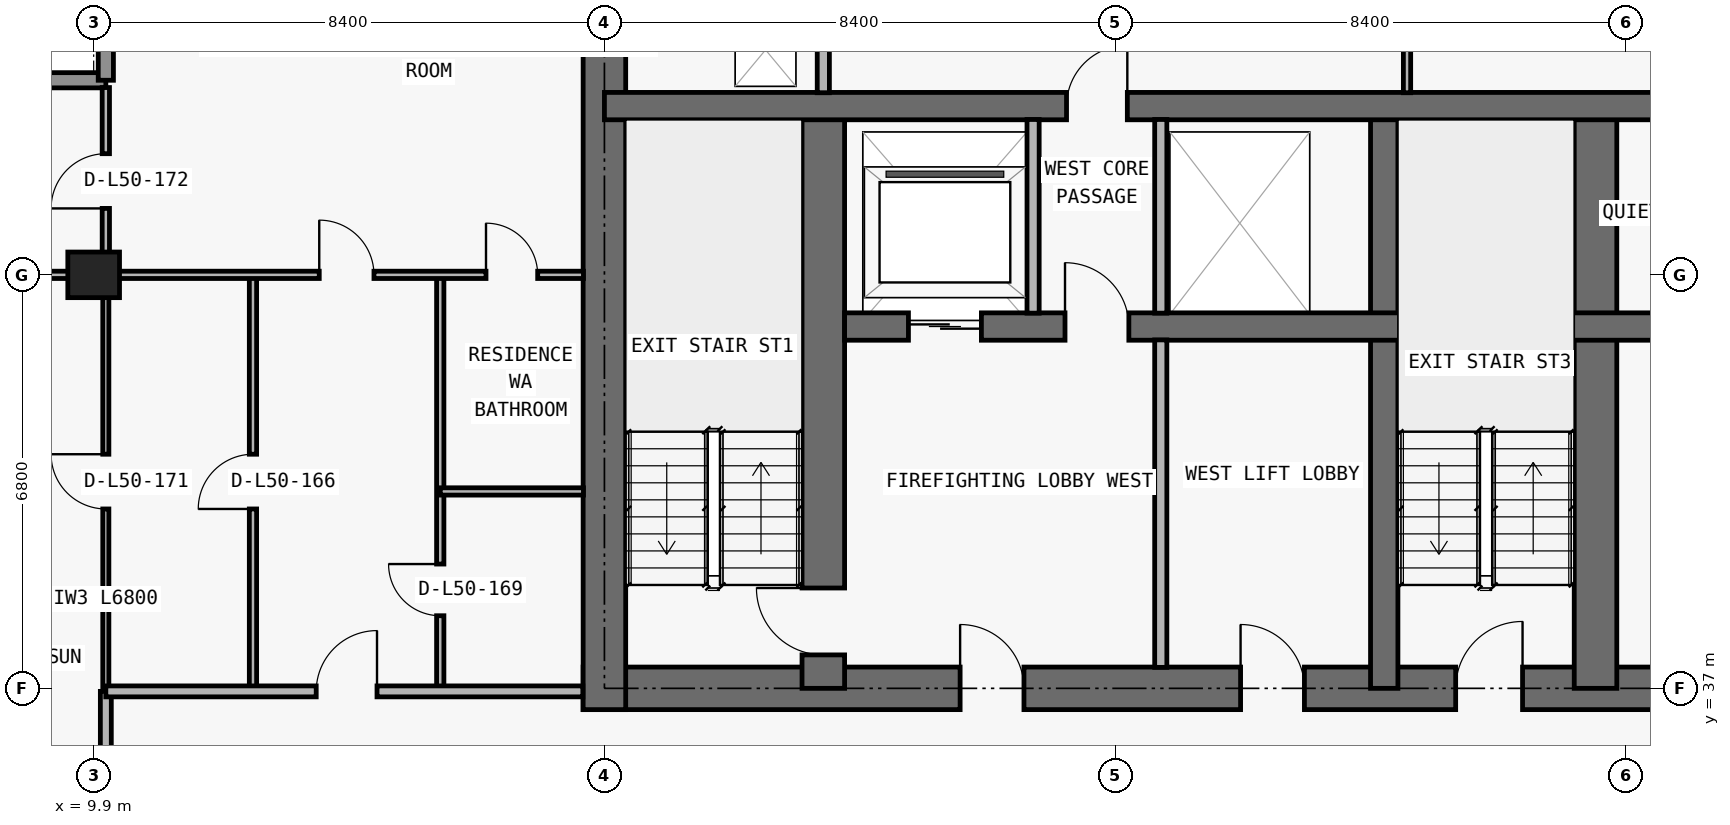
"""IFC4 building model, lengths in metres.
Left out: names, types, materials, properties, quantities, classifications, styles, units other than length and angle.
Written with IfcOpenShell. Run it as: python <this file> out.ifc"""

import sys

from ifc_helpers import new_model, si_unit, direction, frame, frame_2d, origin, origin_2d, place, context, subcontext, project, spatial, rectangle, extrude, element, fill, save


model = new_model("IFC4")
c1 = context("Model", 3, precision=1e-05, world=origin(), true_north=direction((0.0, 1.0)))
c2 = subcontext(c1, "Body", "Model", "MODEL_VIEW")
j1 = project(units=[si_unit("LENGTHUNIT", "METRE"), si_unit("PLANEANGLEUNIT", "RADIAN")], contexts=[c1])
p1 = place(None, origin())
s1 = spatial("IfcSite", under=j1, at=p1, CompositionType="ELEMENT")
p2 = place(p1, origin())
s2 = spatial("IfcBuilding", under=s1, at=p2, CompositionType="ELEMENT")
p3 = place(p2, frame((0.0, 0.0, 180.3)))
s3 = spatial("IfcBuildingStorey", under=s2, at=p3, CompositionType="ELEMENT", Elevation=180.3)
p4 = place(p3, frame((9.9, 43.8, 0.0), z_axis=(0.0, 0.0, 1.0), x_axis=(1.0, 0.0, 0.0)))
e1 = element("IfcColumn", 1, at=p4, inside=s3, PredefinedType="COLUMN", context=c2, shape_type="SweptSolid", body=[
    extrude(rectangle(XDim=0.85, YDim=0.75, at=origin_2d()), origin(), (0.0, 0.0, 1.0), 3.0),
])
p5 = place(p3, frame((17.95, 37.0, 0.0), z_axis=(0.0, 0.0, 1.0), x_axis=(1.0, 0.0, 0.0)))
e2 = element("IfcWall", 2, at=p5, inside=s3, PredefinedType="SHEAR", context=c2, shape_type="SweptSolid", body=[
    extrude(rectangle(XDim=41.9, YDim=0.7, at=frame_2d((20.95, 0.0))), origin(), (0.0, 0.0, 1.0), 3.0),
])
p6 = place(p5, frame((14.35, 0.0, 0.0)))
e3 = element("IfcOpeningElement", 3, at=p6, cuts=e2, PredefinedType="OPENING", context=c2, shape_type="SweptSolid", body=[
    extrude(rectangle(XDim=1.1, YDim=2.15, at=frame_2d((0.55, 1.075))), frame((0.0, 0.36, 0.0), z_axis=(0.0, -1.0, 0.0), x_axis=(1.0, 0.0, 0.0)), (0.0, 0.0, 1.0), 0.72),
])
p7 = place(p5, frame((6.2, 0.0, 0.0)))
e4 = element("IfcOpeningElement", 4, at=p7, cuts=e2, PredefinedType="OPENING", context=c2, shape_type="SweptSolid", body=[
    extrude(rectangle(XDim=1.05, YDim=2.15, at=frame_2d((0.525, 1.075))), frame((0.0, 0.36, 0.0), z_axis=(0.0, -1.0, 0.0), x_axis=(1.0, 0.0, 0.0)), (0.0, 0.0, 1.0), 0.72),
])
p8 = place(p5, frame((34.7, 0.0, 0.0)))
e5 = element("IfcOpeningElement", 5, at=p8, cuts=e2, PredefinedType="OPENING", context=c2, shape_type="SweptSolid", body=[
    extrude(rectangle(XDim=1.05, YDim=2.15, at=frame_2d((0.525, 1.075))), frame((0.0, 0.36, 0.0), z_axis=(0.0, -1.0, 0.0), x_axis=(1.0, 0.0, 0.0)), (0.0, 0.0, 1.0), 0.72),
])
p9 = place(p5, frame((10.812, 0.0, 0.0)))
e6 = element("IfcOpeningElement", 6, at=p9, cuts=e2, PredefinedType="OPENING", context=c2, shape_type="SweptSolid", body=[
    extrude(rectangle(XDim=1.05, YDim=2.15, at=frame_2d((0.525, 1.075))), frame((0.0, 0.36, 0.0), z_axis=(0.0, -1.0, 0.0), x_axis=(1.0, 0.0, 0.0)), (0.0, 0.0, 1.0), 0.72),
])
p10 = place(p5, frame((24.05, 0.0, 0.0)))
e7 = element("IfcOpeningElement", 7, at=p10, cuts=e2, PredefinedType="OPENING", context=c2, shape_type="SweptSolid", body=[
    extrude(rectangle(XDim=1.05, YDim=2.15, at=frame_2d((0.525, 1.075))), frame((0.0, 0.36, 0.0), z_axis=(0.0, -1.0, 0.0), x_axis=(1.0, 0.0, 0.0)), (0.0, 0.0, 1.0), 0.72),
])
p11 = place(p3, frame((18.3, 36.65, 0.0), z_axis=(0.0, 0.0, 1.0), x_axis=(0.0, 1.0, 0.0)))
e8 = element("IfcWall", 8, at=p11, inside=s3, PredefinedType="SHEAR", context=c2, shape_type="SweptSolid", body=[
    extrude(rectangle(XDim=13.95, YDim=0.7, at=frame_2d((6.975, 0.0))), origin(), (0.0, 0.0, 1.0), 3.0),
])
p12 = place(p3, frame((21.9, 37.0, 0.0), z_axis=(0.0, 0.0, 1.0), x_axis=(0.0, 1.0, 0.0)))
e9 = element("IfcWall", 9, at=p12, inside=s3, PredefinedType="SHEAR", context=c2, shape_type="SweptSolid", body=[
    extrude(rectangle(XDim=9.575, YDim=0.7, at=frame_2d((4.788, 0.0))), origin(), (0.0, 0.0, 1.0), 3.0),
])
p13 = place(p12, frame((0.55, 0.0, 0.0)))
e10 = element("IfcOpeningElement", 10, at=p13, cuts=e9, PredefinedType="OPENING", context=c2, shape_type="SweptSolid", body=[
    extrude(rectangle(XDim=1.1, YDim=2.15, at=frame_2d((0.55, 1.075))), frame((0.0, 0.36, 0.0), z_axis=(0.0, -1.0, 0.0), x_axis=(1.0, 0.0, 0.0)), (0.0, 0.0, 1.0), 0.72),
])
p14 = place(p3, frame((31.125, 37.0, 0.0), z_axis=(0.0, 0.0, 1.0), x_axis=(0.0, 1.0, 0.0)))
e11 = element("IfcWall", 11, at=p14, inside=s3, PredefinedType="SHEAR", context=c2, shape_type="SweptSolid", body=[
    extrude(rectangle(XDim=9.575, YDim=0.45, at=frame_2d((4.788, 0.0))), origin(), (0.0, 0.0, 1.0), 3.0),
])
p15 = place(p3, frame((34.6, 37.0, 0.0), z_axis=(0.0, 0.0, 1.0), x_axis=(0.0, 1.0, 0.0)))
e12 = element("IfcWall", 12, at=p15, inside=s3, PredefinedType="SHEAR", context=c2, shape_type="SweptSolid", body=[
    extrude(rectangle(XDim=9.575, YDim=0.7, at=frame_2d((4.788, 0.0))), origin(), (0.0, 0.0, 1.0), 3.0),
])
p16 = place(p3, frame((22.25, 42.95, 0.0), z_axis=(0.0, 0.0, 1.0), x_axis=(1.0, 0.0, 0.0)))
e13 = element("IfcWall", 13, at=p16, inside=s3, PredefinedType="SHEAR", context=c2, shape_type="SweptSolid", body=[
    extrude(rectangle(XDim=33.3, YDim=0.45, at=frame_2d((16.65, 0.0))), origin(), (0.0, 0.0, 1.0), 3.0),
])
p17 = place(p16, frame((1.05, 0.0, 0.0)))
e14 = element("IfcOpeningElement", 14, at=p17, cuts=e13, PredefinedType="OPENING", context=c2, shape_type="SweptSolid", body=[
    extrude(rectangle(XDim=1.2, YDim=2.2, at=frame_2d((0.6, 1.1))), frame((0.0, 0.235, 0.0), z_axis=(0.0, -1.0, 0.0), x_axis=(1.0, 0.0, 0.0)), (0.0, 0.0, 1.0), 0.47),
])
p18 = place(p16, frame((31.05, 0.0, 0.0)))
e15 = element("IfcOpeningElement", 15, at=p18, cuts=e13, PredefinedType="OPENING", context=c2, shape_type="SweptSolid", body=[
    extrude(rectangle(XDim=1.2, YDim=2.2, at=frame_2d((0.6, 1.1))), frame((0.0, 0.235, 0.0), z_axis=(0.0, -1.0, 0.0), x_axis=(1.0, 0.0, 0.0)), (0.0, 0.0, 1.0), 0.47),
])
p19 = place(p16, frame((21.4, 0.0, 0.0)))
e16 = element("IfcOpeningElement", 16, at=p19, cuts=e13, PredefinedType="OPENING", context=c2, shape_type="SweptSolid", body=[
    extrude(rectangle(XDim=1.1, YDim=2.2, at=frame_2d((0.55, 1.1))), frame((0.0, 0.235, 0.0), z_axis=(0.0, -1.0, 0.0), x_axis=(1.0, 0.0, 0.0)), (0.0, 0.0, 1.0), 0.47),
])
p20 = place(p16, frame((24.0, 0.0, 0.0)))
e17 = element("IfcOpeningElement", 17, at=p20, cuts=e13, PredefinedType="OPENING", context=c2, shape_type="SweptSolid", body=[
    extrude(rectangle(XDim=1.1, YDim=2.2, at=frame_2d((0.55, 1.1))), frame((0.0, 0.235, 0.0), z_axis=(0.0, -1.0, 0.0), x_axis=(1.0, 0.0, 0.0)), (0.0, 0.0, 1.0), 0.47),
])
p21 = place(p16, frame((3.625, 0.0, 0.0)))
e18 = element("IfcOpeningElement", 18, at=p21, cuts=e13, PredefinedType="OPENING", context=c2, shape_type="SweptSolid", body=[
    extrude(rectangle(XDim=1.05, YDim=2.15, at=frame_2d((0.525, 1.075))), frame((0.0, 0.235, 0.0), z_axis=(0.0, -1.0, 0.0), x_axis=(1.0, 0.0, 0.0)), (0.0, 0.0, 1.0), 0.47),
])
p22 = place(p16, frame((28.675, 0.0, 0.0)))
e19 = element("IfcOpeningElement", 19, at=p22, cuts=e13, PredefinedType="OPENING", context=c2, shape_type="SweptSolid", body=[
    extrude(rectangle(XDim=1.05, YDim=2.15, at=frame_2d((0.525, 1.075))), frame((0.0, 0.235, 0.0), z_axis=(0.0, -1.0, 0.0), x_axis=(1.0, 0.0, 0.0)), (0.0, 0.0, 1.0), 0.47),
])
p23 = place(p16, frame((15.975, 0.0, 0.0)))
e20 = element("IfcOpeningElement", 20, at=p23, cuts=e13, PredefinedType="OPENING", context=c2, shape_type="SweptSolid", body=[
    extrude(rectangle(XDim=1.0, YDim=2.2, at=frame_2d((0.5, 1.1))), frame((0.0, 0.235, 0.0), z_axis=(0.0, -1.0, 0.0), x_axis=(1.0, 0.0, 0.0)), (0.0, 0.0, 1.0), 0.47),
])
p24 = place(p3, frame((18.3, 46.575, 0.0), z_axis=(0.0, 0.0, 1.0), x_axis=(1.0, 0.0, 0.0)))
e21 = element("IfcWall", 21, at=p24, inside=s3, PredefinedType="SHEAR", context=c2, shape_type="SweptSolid", body=[
    extrude(rectangle(XDim=41.2, YDim=0.45, at=frame_2d((20.6, 0.0))), origin(), (0.0, 0.0, 1.0), 3.0),
])
p25 = place(p24, frame((7.6, 0.0, 0.0)))
e22 = element("IfcOpeningElement", 22, at=p25, cuts=e21, PredefinedType="OPENING", context=c2, shape_type="SweptSolid", body=[
    extrude(rectangle(XDim=1.0, YDim=2.2, at=frame_2d((0.5, 1.1))), frame((0.0, 0.235, 0.0), z_axis=(0.0, -1.0, 0.0), x_axis=(1.0, 0.0, 0.0)), (0.0, 0.0, 1.0), 0.47),
])
p26 = place(p24, frame((32.625, 0.0, 0.0)))
e23 = element("IfcOpeningElement", 23, at=p26, cuts=e21, PredefinedType="OPENING", context=c2, shape_type="SweptSolid", body=[
    extrude(rectangle(XDim=1.05, YDim=2.15, at=frame_2d((0.525, 1.075))), frame((0.0, 0.235, 0.0), z_axis=(0.0, -1.0, 0.0), x_axis=(1.0, 0.0, 0.0)), (0.0, 0.0, 1.0), 0.47),
])
p27 = place(p3, frame((6.25, 47.0, 0.0), z_axis=(0.0, 0.0, 1.0), x_axis=(1.0, 0.0, 0.0)))
e24 = element("IfcWall", 24, at=p27, inside=s3, PredefinedType="ELEMENTEDWALL", context=c2, shape_type="SweptSolid", body=[
    extrude(rectangle(XDim=3.85, YDim=0.25, at=frame_2d((1.925, 0.0))), origin(), (0.0, 0.0, 1.0), 3.0),
])
p28 = place(p3, frame((10.1, 47.0, 0.0), z_axis=(0.0, 0.0, 1.0), x_axis=(0.0, 1.0, 0.0)))
e25 = element("IfcWall", 25, at=p28, inside=s3, PredefinedType="ELEMENTEDWALL", context=c2, shape_type="SweptSolid", body=[
    extrude(rectangle(XDim=3.45, YDim=0.25, at=frame_2d((1.725, 0.0))), origin(), (0.0, 0.0, 1.0), 3.0),
])
p29 = place(p3, frame((10.1, 34.605, 0.0), z_axis=(0.0, 0.0, 1.0), x_axis=(0.0, 1.0, 0.0)))
e26 = element("IfcWall", 26, at=p29, inside=s3, PredefinedType="PARTITIONING", context=c2, shape_type="SweptSolid", body=[
    extrude(rectangle(XDim=2.345, YDim=0.18, at=frame_2d((1.172, 0.0))), origin(), (0.0, 0.0, 1.0), 2.213),
])
p30 = place(p3, frame((10.1, 37.0, 0.0), z_axis=(0.0, 0.0, 1.0), x_axis=(0.0, 1.0, 0.0)))
e27 = element("IfcWall", 27, at=p30, inside=s3, PredefinedType="MOVABLE", context=c2, shape_type="SweptSolid", body=[
    extrude(rectangle(XDim=6.8, YDim=0.1, at=frame_2d((3.4, 0.0))), origin(), (0.0, 0.0, 1.0), 2.213),
])
p31 = place(p30, frame((2.95, 0.0, 0.0)))
e28 = element("IfcOpeningElement", 28, at=p31, cuts=e27, PredefinedType="OPENING", context=c2, shape_type="SweptSolid", body=[
    extrude(rectangle(XDim=0.9, YDim=2.15, at=frame_2d((0.45, 1.075))), frame((0.0, 0.06, 0.0), z_axis=(0.0, -1.0, 0.0), x_axis=(1.0, 0.0, 0.0)), (0.0, 0.0, 1.0), 0.12),
])
p32 = place(p3, frame((10.1, 43.805, 0.0), z_axis=(0.0, 0.0, 1.0), x_axis=(0.0, 1.0, 0.0)))
e29 = element("IfcWall", 29, at=p32, inside=s3, PredefinedType="PARTITIONING", context=c2, shape_type="SweptSolid", body=[
    extrude(rectangle(XDim=3.075, YDim=0.12, at=frame_2d((1.538, 0.0))), origin(), (0.0, 0.0, 1.0), 3.0),
])
p33 = place(p32, frame((1.087, 0.0, 0.0)))
e30 = element("IfcOpeningElement", 30, at=p33, cuts=e29, PredefinedType="OPENING", context=c2, shape_type="SweptSolid", body=[
    extrude(rectangle(XDim=0.9, YDim=2.15, at=frame_2d((0.45, 1.075))), frame((0.0, 0.07, 0.0), z_axis=(0.0, -1.0, 0.0), x_axis=(1.0, 0.0, 0.0)), (0.0, 0.0, 1.0), 0.14),
])
p34 = place(p3, frame((12.52, 37.0, 0.0), z_axis=(0.0, 0.0, 1.0), x_axis=(0.0, 1.0, 0.0)))
e31 = element("IfcWall", 31, at=p34, inside=s3, PredefinedType="PARTITIONING", context=c2, shape_type="SweptSolid", body=[
    extrude(rectangle(XDim=6.8, YDim=0.12, at=frame_2d((3.4, 0.0))), origin(), (0.0, 0.0, 1.0), 3.0),
])
p35 = place(p34, frame((2.95, 0.0, 0.0)))
e32 = element("IfcOpeningElement", 32, at=p35, cuts=e31, PredefinedType="OPENING", context=c2, shape_type="SweptSolid", body=[
    extrude(rectangle(XDim=0.9, YDim=2.15, at=frame_2d((0.45, 1.075))), frame((0.0, 0.07, 0.0), z_axis=(0.0, -1.0, 0.0), x_axis=(1.0, 0.0, 0.0)), (0.0, 0.0, 1.0), 0.14),
])
p36 = place(p3, frame((15.6, 37.0, 0.0), z_axis=(0.0, 0.0, 1.0), x_axis=(0.0, 1.0, 0.0)))
e33 = element("IfcWall", 33, at=p36, inside=s3, PredefinedType="PARTITIONING", context=c2, shape_type="SweptSolid", body=[
    extrude(rectangle(XDim=6.8, YDim=0.12, at=frame_2d((3.4, 0.0))), origin(), (0.0, 0.0, 1.0), 3.0),
])
p37 = place(p36, frame((1.194, 0.0, 0.0)))
e34 = element("IfcOpeningElement", 34, at=p37, cuts=e33, PredefinedType="OPENING", context=c2, shape_type="SweptSolid", body=[
    extrude(rectangle(XDim=0.85, YDim=2.1, at=frame_2d((0.425, 1.05))), frame((0.0, 0.07, 0.0), z_axis=(0.0, -1.0, 0.0), x_axis=(1.0, 0.0, 0.0)), (0.0, 0.0, 1.0), 0.14),
])
p38 = place(p3, frame((21.9, 46.795, 0.0), z_axis=(0.0, 0.0, 1.0), x_axis=(0.0, 1.0, 0.0)))
e35 = element("IfcWall", 35, at=p38, inside=s3, PredefinedType="PARTITIONING", context=c2, shape_type="SweptSolid", body=[
    extrude(rectangle(XDim=3.16, YDim=0.2, at=frame_2d((1.58, 0.0))), origin(), (0.0, 0.0, 1.0), 3.0),
])
p39 = place(p3, frame((25.35, 43.17, 0.0), z_axis=(0.0, 0.0, 1.0), x_axis=(0.0, 1.0, 0.0)))
e36 = element("IfcWall", 36, at=p39, inside=s3, PredefinedType="PARTITIONING", context=c2, shape_type="SweptSolid", body=[
    extrude(rectangle(XDim=3.185, YDim=0.2, at=frame_2d((1.593, 0.0))), origin(), (0.0, 0.0, 1.0), 3.0),
])
p40 = place(p3, frame((27.45, 37.345, 0.0), z_axis=(0.0, 0.0, 1.0), x_axis=(0.0, 1.0, 0.0)))
e37 = element("IfcWall", 37, at=p40, inside=s3, PredefinedType="PARTITIONING", context=c2, shape_type="SweptSolid", body=[
    extrude(rectangle(XDim=5.385, YDim=0.2, at=frame_2d((2.692, 0.0))), origin(), (0.0, 0.0, 1.0), 3.0),
])
p41 = place(p3, frame((27.45, 43.17, 0.0), z_axis=(0.0, 0.0, 1.0), x_axis=(0.0, 1.0, 0.0)))
e38 = element("IfcWall", 38, at=p41, inside=s3, PredefinedType="PARTITIONING", context=c2, shape_type="SweptSolid", body=[
    extrude(rectangle(XDim=3.185, YDim=0.2, at=frame_2d((1.593, 0.0))), origin(), (0.0, 0.0, 1.0), 3.0),
])
p42 = place(p3, frame((31.5, 46.795, 0.0), z_axis=(0.0, 0.0, 1.0), x_axis=(0.0, 1.0, 0.0)))
e39 = element("IfcWall", 39, at=p42, inside=s3, PredefinedType="PARTITIONING", context=c2, shape_type="SweptSolid", body=[
    extrude(rectangle(XDim=3.16, YDim=0.12, at=frame_2d((1.58, 0.0))), origin(), (0.0, 0.0, 1.0), 3.0),
])
p43 = place(p3, frame((10.1, 36.95, 0.0), z_axis=(0.0, 0.0, 1.0), x_axis=(1.0, 0.0, 0.0)))
e40 = element("IfcWall", 40, at=p43, inside=s3, PredefinedType="PARTITIONING", context=c2, shape_type="SweptSolid", body=[
    extrude(rectangle(XDim=7.845, YDim=0.18, at=frame_2d((3.922, 0.0))), origin(), (0.0, 0.0, 1.0), 3.0),
])
p44 = place(p43, frame((3.46, 0.0, 0.0)))
e41 = element("IfcOpeningElement", 41, at=p44, cuts=e40, PredefinedType="OPENING", context=c2, shape_type="SweptSolid", body=[
    extrude(rectangle(XDim=1.0, YDim=2.2, at=frame_2d((0.5, 1.1))), frame((0.0, 0.1, 0.0), z_axis=(0.0, -1.0, 0.0), x_axis=(1.0, 0.0, 0.0)), (0.0, 0.0, 1.0), 0.2),
])
p45 = place(p3, frame((15.6, 40.238, 0.0), z_axis=(0.0, 0.0, 1.0), x_axis=(1.0, 0.0, 0.0)))
e42 = element("IfcWall", 42, at=p45, inside=s3, PredefinedType="PARTITIONING", context=c2, shape_type="SweptSolid", body=[
    extrude(rectangle(XDim=2.355, YDim=0.12, at=frame_2d((1.177, 0.0))), origin(), (0.0, 0.0, 1.0), 3.0),
])
p46 = place(p3, frame((6.395, 43.8, 0.0), z_axis=(0.0, 0.0, 1.0), x_axis=(1.0, 0.0, 0.0)))
e43 = element("IfcWall", 43, at=p46, inside=s3, PredefinedType="PARTITIONING", context=c2, shape_type="SweptSolid", body=[
    extrude(rectangle(XDim=11.56, YDim=0.12, at=frame_2d((5.78, 0.0))), origin(), (0.0, 0.0, 1.0), 2.368),
])
p47 = place(p46, frame((7.215, 0.0, 0.0)))
e44 = element("IfcOpeningElement", 44, at=p47, cuts=e43, PredefinedType="OPENING", context=c2, shape_type="SweptSolid", body=[
    extrude(rectangle(XDim=0.9, YDim=2.15, at=frame_2d((0.45, 1.075))), frame((0.0, 0.07, 0.0), z_axis=(0.0, -1.0, 0.0), x_axis=(1.0, 0.0, 0.0)), (0.0, 0.0, 1.0), 0.14),
])
p48 = place(p46, frame((9.958, 0.0, 0.0)))
e45 = element("IfcOpeningElement", 45, at=p48, cuts=e43, PredefinedType="OPENING", context=c2, shape_type="SweptSolid", body=[
    extrude(rectangle(XDim=0.85, YDim=2.1, at=frame_2d((0.425, 1.05))), frame((0.0, 0.07, 0.0), z_axis=(0.0, -1.0, 0.0), x_axis=(1.0, 0.0, 0.0)), (0.0, 0.0, 1.0), 0.14),
])
p49 = place(p17, origin())
e46 = element("IfcDoor", 46, at=p49, inside=s3, OperationType="DOUBLE_DOOR_SLIDING", PredefinedType="DOOR", context=c2, shape_type="SweptSolid", body=[
    extrude(rectangle(XDim=1.2, YDim=2.2, at=frame_2d((0.6, 1.1))), frame((0.0, 0.025, 0.0), z_axis=(0.0, -1.0, 0.0), x_axis=(1.0, 0.0, 0.0)), (0.0, 0.0, 1.0), 0.05),
])
fill(e14, e46)
p50 = place(p6, origin())
e47 = element("IfcDoor", 47, at=p50, inside=s3, OperationType="SINGLE_SWING_RIGHT", PredefinedType="DOOR", context=c2, shape_type="SweptSolid", body=[
    extrude(rectangle(XDim=1.1, YDim=2.15, at=frame_2d((0.55, 1.075))), frame((0.0, 0.025, 0.0), z_axis=(0.0, -1.0, 0.0), x_axis=(1.0, 0.0, 0.0)), (0.0, 0.0, 1.0), 0.05),
])
fill(e3, e47)
p51 = place(p7, origin())
e48 = element("IfcDoor", 48, at=p51, inside=s3, OperationType="SINGLE_SWING_LEFT", PredefinedType="DOOR", context=c2, shape_type="SweptSolid", body=[
    extrude(rectangle(XDim=1.05, YDim=2.15, at=frame_2d((0.525, 1.075))), frame((0.0, 0.025, 0.0), z_axis=(0.0, -1.0, 0.0), x_axis=(1.0, 0.0, 0.0)), (0.0, 0.0, 1.0), 0.05),
])
fill(e4, e48)
p52 = place(p13, origin())
e49 = element("IfcDoor", 49, at=p52, inside=s3, OperationType="SINGLE_SWING_RIGHT", PredefinedType="DOOR", context=c2, shape_type="SweptSolid", body=[
    extrude(rectangle(XDim=1.1, YDim=2.15, at=frame_2d((0.55, 1.075))), frame((0.0, 0.025, 0.0), z_axis=(0.0, -1.0, 0.0), x_axis=(1.0, 0.0, 0.0)), (0.0, 0.0, 1.0), 0.05),
])
fill(e10, e49)
p53 = place(p21, origin())
e50 = element("IfcDoor", 50, at=p53, inside=s3, OperationType="SINGLE_SWING_LEFT", PredefinedType="DOOR", context=c2, shape_type="SweptSolid", body=[
    extrude(rectangle(XDim=1.05, YDim=2.15, at=frame_2d((0.525, 1.075))), frame((0.0, 0.025, 0.0), z_axis=(0.0, -1.0, 0.0), x_axis=(1.0, 0.0, 0.0)), (0.0, 0.0, 1.0), 0.05),
])
fill(e18, e50)
p54 = place(p9, origin())
e51 = element("IfcDoor", 51, at=p54, inside=s3, OperationType="SINGLE_SWING_LEFT", PredefinedType="DOOR", context=c2, shape_type="SweptSolid", body=[
    extrude(rectangle(XDim=1.05, YDim=2.15, at=frame_2d((0.525, 1.075))), frame((0.0, 0.025, 0.0), z_axis=(0.0, -1.0, 0.0), x_axis=(1.0, 0.0, 0.0)), (0.0, 0.0, 1.0), 0.05),
])
fill(e6, e51)
p55 = place(p25, origin())
e52 = element("IfcDoor", 52, at=p55, inside=s3, OperationType="SINGLE_SWING_RIGHT", PredefinedType="DOOR", context=c2, shape_type="SweptSolid", body=[
    extrude(rectangle(XDim=1.0, YDim=2.2, at=frame_2d((0.5, 1.1))), frame((0.0, 0.025, 0.0), z_axis=(0.0, -1.0, 0.0), x_axis=(1.0, 0.0, 0.0)), (0.0, 0.0, 1.0), 0.05),
])
fill(e22, e52)
p56 = place(p35, origin())
e53 = element("IfcDoor", 53, at=p56, inside=s3, OperationType="SINGLE_SWING_LEFT", PredefinedType="DOOR", context=c2, shape_type="SweptSolid", body=[
    extrude(rectangle(XDim=0.9, YDim=2.15, at=frame_2d((0.45, 1.075))), frame((0.0, 0.025, 0.0), z_axis=(0.0, -1.0, 0.0), x_axis=(1.0, 0.0, 0.0)), (0.0, 0.0, 1.0), 0.05),
])
fill(e32, e53)
p57 = place(p44, origin())
e54 = element("IfcDoor", 54, at=p57, inside=s3, OperationType="SINGLE_SWING_RIGHT", PredefinedType="DOOR", context=c2, shape_type="SweptSolid", body=[
    extrude(rectangle(XDim=1.0, YDim=2.2, at=frame_2d((0.5, 1.1))), frame((0.0, 0.025, 0.0), z_axis=(0.0, -1.0, 0.0), x_axis=(1.0, 0.0, 0.0)), (0.0, 0.0, 1.0), 0.05),
])
fill(e41, e54)
p58 = place(p47, origin())
e55 = element("IfcDoor", 55, at=p58, inside=s3, OperationType="SINGLE_SWING_LEFT", PredefinedType="DOOR", context=c2, shape_type="SweptSolid", body=[
    extrude(rectangle(XDim=0.9, YDim=2.15, at=frame_2d((0.45, 1.075))), frame((0.0, 0.025, 0.0), z_axis=(0.0, -1.0, 0.0), x_axis=(1.0, 0.0, 0.0)), (0.0, 0.0, 1.0), 0.05),
])
fill(e44, e55)
p59 = place(p37, origin())
e56 = element("IfcDoor", 56, at=p59, inside=s3, OperationType="SINGLE_SWING_RIGHT", PredefinedType="DOOR", context=c2, shape_type="SweptSolid", body=[
    extrude(rectangle(XDim=0.85, YDim=2.1, at=frame_2d((0.425, 1.05))), frame((0.0, 0.025, 0.0), z_axis=(0.0, -1.0, 0.0), x_axis=(1.0, 0.0, 0.0)), (0.0, 0.0, 1.0), 0.05),
])
fill(e34, e56)
p60 = place(p48, origin())
e57 = element("IfcDoor", 57, at=p60, inside=s3, OperationType="SINGLE_SWING_LEFT", PredefinedType="DOOR", context=c2, shape_type="SweptSolid", body=[
    extrude(rectangle(XDim=0.85, YDim=2.1, at=frame_2d((0.425, 1.05))), frame((0.0, 0.025, 0.0), z_axis=(0.0, -1.0, 0.0), x_axis=(1.0, 0.0, 0.0)), (0.0, 0.0, 1.0), 0.05),
])
fill(e45, e57)
p61 = place(p31, origin())
e58 = element("IfcDoor", 58, at=p61, inside=s3, OperationType="SINGLE_SWING_RIGHT", PredefinedType="DOOR", context=c2, shape_type="SweptSolid", body=[
    extrude(rectangle(XDim=0.9, YDim=2.15, at=frame_2d((0.45, 1.075))), frame((0.0, 0.025, 0.0), z_axis=(0.0, -1.0, 0.0), x_axis=(1.0, 0.0, 0.0)), (0.0, 0.0, 1.0), 0.05),
])
fill(e28, e58)
p62 = place(p33, origin())
e59 = element("IfcDoor", 59, at=p62, inside=s3, OperationType="SINGLE_SWING_LEFT", PredefinedType="DOOR", context=c2, shape_type="SweptSolid", body=[
    extrude(rectangle(XDim=0.9, YDim=2.15, at=frame_2d((0.45, 1.075))), frame((0.0, 0.025, 0.0), z_axis=(0.0, -1.0, 0.0), x_axis=(1.0, 0.0, 0.0)), (0.0, 0.0, 1.0), 0.05),
])
fill(e30, e59)
save(model, sys.argv[1])
